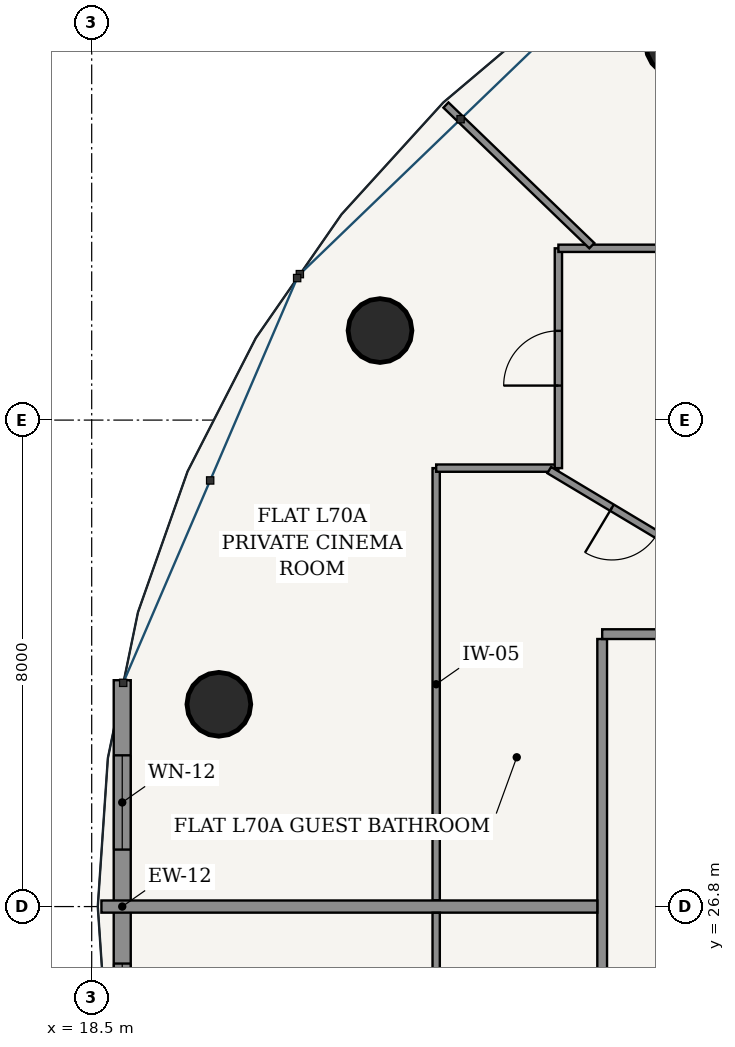
"""IFC4 building model, lengths in metres.
Left out: names, types, materials, properties, quantities, classifications, styles, units other than length and angle.
Written with IfcOpenShell. Run it as: python <this file> out.ifc"""

import sys

from ifc_helpers import new_model, si_unit, direction, frame, frame_2d, origin, origin_2d, place, context, subcontext, project, spatial, rectangle, hollow_circle, extrude, source, transform, mapped, element, fill, save


model = new_model("IFC4")
c1 = context("Model", 3, precision=1e-05, world=origin(), true_north=direction((-0.2419218956, 0.970295726276)))
c2 = subcontext(c1, "Body", "Model", "MODEL_VIEW")
j1 = project(units=[si_unit("LENGTHUNIT", "METRE"), si_unit("PLANEANGLEUNIT", "RADIAN")], contexts=[c1])
p1 = place(None, origin())
s1 = spatial("IfcSite", under=j1, at=p1, CompositionType="ELEMENT")
p2 = place(p1, origin())
s2 = spatial("IfcBuilding", under=s1, at=p2, CompositionType="ELEMENT")
p3 = place(p2, frame((0.0, 0.0, 266.95)))
s3 = spatial("IfcBuildingStorey", under=s2, at=p3, CompositionType="ELEMENT", Elevation=266.95)
for number, where, z_axis, x_axis in (
    (1, (28.139, 40.977, 0.0), (0.0, 0.0, 1.0), (1.0, 0.0, 0.0)),
    (2, (23.241, 36.272, 0.0), (0.0, 0.0, 1.0), (1.0, 0.0, 0.0)),
    (3, (20.591, 30.126, 0.0), (0.0, 0.0, 1.0), (1.0, 0.0, 0.0)),
):
    element("IfcColumn", number, at=place(p3, frame(where, z_axis=z_axis, x_axis=x_axis)), inside=s3, PredefinedType="COLUMN", context=c2, shape_type="SweptSolid", body=[
        extrude(hollow_circle(Radius=0.525, WallThickness=0.035, at=origin_2d()), origin(), (0.0, 0.0, 1.0), 3.75),
    ])
p4 = place(p3, frame((19.002, 30.522, 0.0), z_axis=(0.0, 0.0, 1.0), x_axis=(0.0, -1.0, 0.0)))
e4 = element("IfcWall", 4, at=p4, inside=s3, PredefinedType="SOLIDWALL", context=c2, shape_type="SweptSolid", body=[
    extrude(rectangle(XDim=7.445, YDim=0.28, at=frame_2d((3.722, 0.0))), origin(), (0.0, 0.0, 1.0), 3.49),
])
p5 = place(p4, frame((1.235, 0.0, 0.85)))
e5 = element("IfcOpeningElement", 5, at=p5, cuts=e4, PredefinedType="OPENING", context=c2, shape_type="SweptSolid", body=[
    extrude(rectangle(XDim=1.55, YDim=1.95, at=frame_2d((0.775, 0.975))), frame((0.0, 0.15, 0.0), z_axis=(0.0, -1.0, 0.0), x_axis=(1.0, 0.0, 0.0)), (0.0, 0.0, 1.0), 0.3),
])
p6 = place(p4, frame((4.66, 0.0, 0.85)))
e6 = element("IfcOpeningElement", 6, at=p6, cuts=e4, PredefinedType="OPENING", context=c2, shape_type="SweptSolid", body=[
    extrude(rectangle(XDim=1.55, YDim=1.95, at=frame_2d((0.775, 0.975))), frame((0.0, 0.15, 0.0), z_axis=(0.0, -1.0, 0.0), x_axis=(1.0, 0.0, 0.0)), (0.0, 0.0, 1.0), 0.3),
])
p7 = place(p3, frame((26.895, 17.275, 0.0), z_axis=(0.0, 0.0, 1.0), x_axis=(0.0, 1.0, 0.0)))
e7 = element("IfcWall", 7, at=p7, inside=s3, PredefinedType="PARTITIONING", context=c2, shape_type="SweptSolid", body=[
    extrude(rectangle(XDim=13.925, YDim=0.16, at=frame_2d((6.962, 0.0))), origin(), (0.0, 0.0, 1.0), 3.015),
])
p8 = place(p7, frame((1.992, 0.0, 0.0)))
e8 = element("IfcOpeningElement", 8, at=p8, cuts=e7, PredefinedType="OPENING", context=c2, shape_type="SweptSolid", body=[
    extrude(rectangle(XDim=0.98, YDim=2.2, at=frame_2d((0.49, 1.1))), frame((0.0, 0.09, 0.0), z_axis=(0.0, -1.0, 0.0), x_axis=(1.0, 0.0, 0.0)), (0.0, 0.0, 1.0), 0.18),
])
p9 = place(p3, frame((26.895, 31.28, 0.0), z_axis=(0.0, 0.0, 1.0), x_axis=(1.0, 0.0, 0.0)))
e9 = element("IfcWall", 9, at=p9, inside=s3, PredefinedType="PARTITIONING", context=c2, shape_type="SweptSolid", body=[
    extrude(rectangle(XDim=1.93, YDim=0.16, at=frame_2d((0.965, 0.0))), origin(), (0.0, 0.0, 1.0), 3.49),
])
p10 = place(p3, frame((24.165, 26.902, 0.0), z_axis=(0.0, 0.0, 1.0), x_axis=(0.0, 1.0, 0.0)))
e10 = element("IfcWall", 10, at=p10, inside=s3, PredefinedType="PARTITIONING", context=c2, shape_type="SweptSolid", body=[
    extrude(rectangle(XDim=7.108, YDim=0.12, at=frame_2d((3.554, 0.0))), origin(), (0.0, 0.0, 1.0), 3.015),
])
p11 = place(p3, frame((24.165, 34.01, 0.0), z_axis=(0.0, 0.0, 1.0), x_axis=(1.0, 0.0, 0.0)))
e11 = element("IfcWall", 11, at=p11, inside=s3, PredefinedType="PARTITIONING", context=c2, shape_type="SweptSolid", body=[
    extrude(rectangle(XDim=2.01, YDim=0.12, at=frame_2d((1.005, 0.0))), origin(), (0.0, 0.0, 1.0), 3.209),
])
p12 = place(p3, frame((26.175, 34.01, 0.0), z_axis=(0.0, 0.0, 1.0), x_axis=(0.0, 1.0, 0.0)))
e12 = element("IfcWall", 12, at=p12, inside=s3, PredefinedType="PARTITIONING", context=c2, shape_type="SweptSolid", body=[
    extrude(rectangle(XDim=3.615, YDim=0.12, at=frame_2d((1.808, 0.0))), origin(), (0.0, 0.0, 1.0), 3.015),
])
p13 = place(p12, frame((1.357, 0.0, 0.0)))
e13 = element("IfcOpeningElement", 13, at=p13, cuts=e12, PredefinedType="OPENING", context=c2, shape_type="SweptSolid", body=[
    extrude(rectangle(XDim=0.9, YDim=2.15, at=frame_2d((0.45, 1.075))), frame((0.0, 0.07, 0.0), z_axis=(0.0, -1.0, 0.0), x_axis=(1.0, 0.0, 0.0)), (0.0, 0.0, 1.0), 0.14),
])
p14 = place(p3, frame((26.175, 37.625, 0.0), z_axis=(0.0, 0.0, 1.0), x_axis=(1.0, 0.0, 0.0)))
e14 = element("IfcWall", 14, at=p14, inside=s3, PredefinedType="PARTITIONING", context=c2, shape_type="SweptSolid", body=[
    extrude(rectangle(XDim=23.65, YDim=0.12, at=frame_2d((11.825, 0.0))), origin(), (0.0, 0.0, 1.0), 3.015),
])
p15 = place(p14, frame((14.733, 0.0, 0.0)))
e15 = element("IfcOpeningElement", 15, at=p15, cuts=e14, PredefinedType="OPENING", context=c2, shape_type="SweptSolid", body=[
    extrude(rectangle(XDim=0.9, YDim=2.15, at=frame_2d((0.45, 1.075))), frame((0.0, 0.07, 0.0), z_axis=(0.0, -1.0, 0.0), x_axis=(1.0, 0.0, 0.0)), (0.0, 0.0, 1.0), 0.14),
])
p16 = place(p14, frame((11.279, 0.0, 0.0)))
e16 = element("IfcOpeningElement", 16, at=p16, cuts=e14, PredefinedType="OPENING", context=c2, shape_type="SweptSolid", body=[
    extrude(rectangle(XDim=0.9, YDim=2.15, at=frame_2d((0.45, 1.075))), frame((0.0, 0.07, 0.0), z_axis=(0.0, -1.0, 0.0), x_axis=(1.0, 0.0, 0.0)), (0.0, 0.0, 1.0), 0.14),
])
p17 = place(p14, frame((2.678, 0.0, 0.0)))
e17 = element("IfcOpeningElement", 17, at=p17, cuts=e14, PredefinedType="OPENING", context=c2, shape_type="SweptSolid", body=[
    extrude(rectangle(XDim=0.9, YDim=2.15, at=frame_2d((0.45, 1.075))), frame((0.0, 0.07, 0.0), z_axis=(0.0, -1.0, 0.0), x_axis=(1.0, 0.0, 0.0)), (0.0, 0.0, 1.0), 0.14),
])
p18 = place(p3, frame((26.725, 37.668, 0.0), z_axis=(0.0, 0.0, 1.0), x_axis=(-0.719954096891, 0.694021684366, 0.0)))
e18 = element("IfcWall", 18, at=p18, inside=s3, PredefinedType="PARTITIONING", context=c2, shape_type="SweptSolid", body=[
    extrude(rectangle(XDim=3.333, YDim=0.12, at=frame_2d((1.667, 0.0))), origin(), (0.0, 0.0, 1.0), 3.121),
])
p19 = place(p3, frame((28.825, 32.3, 0.0), z_axis=(0.0, 0.0, 1.0), x_axis=(-0.857743539935, 0.514077834282, 0.0)))
e19 = element("IfcWall", 19, at=p19, inside=s3, PredefinedType="PARTITIONING", context=c2, shape_type="SweptSolid", body=[
    extrude(rectangle(XDim=3.265, YDim=0.12, at=frame_2d((1.632, 0.0))), origin(), (0.0, 0.0, 1.0), 3.49),
])
p20 = place(p19, frame((1.202, 0.0, 0.0)))
e20 = element("IfcOpeningElement", 20, at=p20, cuts=e19, PredefinedType="OPENING", context=c2, shape_type="SweptSolid", body=[
    extrude(rectangle(XDim=0.86, YDim=2.15, at=frame_2d((0.43, 1.075))), frame((0.0, 0.07, 0.0), z_axis=(0.0, -1.0, 0.0), x_axis=(1.0, 0.0, 0.0)), (0.0, 0.0, 1.0), 0.14),
])
p21 = place(p3, frame((26.815, 26.8, 0.0), z_axis=(0.0, 0.0, 1.0), x_axis=(-1.0, 0.0, 0.0)))
e21 = element("IfcWall", 21, at=p21, inside=s3, PredefinedType="PARTITIONING", context=c2, shape_type="SweptSolid", body=[
    extrude(rectangle(XDim=8.155, YDim=0.2, at=frame_2d((4.078, 0.0))), origin(), (0.0, 0.0, 1.0), 3.121),
])
p22 = place(p3, frame((24.165, 14.465, 0.0), z_axis=(0.0, 0.0, 1.0), x_axis=(0.0, 1.0, 0.0)))
e22 = element("IfcWall", 22, at=p22, inside=s3, PredefinedType="PARTITIONING", context=c2, shape_type="SweptSolid", body=[
    extrude(rectangle(XDim=12.233, YDim=0.12, at=frame_2d((6.116, 0.0))), origin(), (0.0, 0.0, 1.0), 3.015),
])
p23 = place(p22, frame((3.863, 0.0, 0.0)))
e23 = element("IfcOpeningElement", 23, at=p23, cuts=e22, PredefinedType="OPENING", context=c2, shape_type="SweptSolid", body=[
    extrude(rectangle(XDim=0.9, YDim=2.15, at=frame_2d((0.45, 1.075))), frame((0.0, 0.07, 0.0), z_axis=(0.0, -1.0, 0.0), x_axis=(1.0, 0.0, 0.0)), (0.0, 0.0, 1.0), 0.14),
])
m1 = source(origin(), c2, "Body", "SweptSolid", [
    extrude(rectangle(XDim=1.55, YDim=1.95, at=frame_2d((0.775, 0.975))), frame((0.0, 0.03, 0.0), z_axis=(0.0, -1.0, 0.0), x_axis=(1.0, 0.0, 0.0)), (0.0, 0.0, 1.0), 0.06),
])
p24 = place(p5, origin())
e24 = element("IfcWindow", 24, at=p24, inside=s3, PartitioningType="SINGLE_PANEL", PredefinedType="WINDOW", context=c2, shape_type="MappedRepresentation", body=[
    mapped(m1, transform((0.0, 0.0, 0.0), scale=1.0)),
])
fill(e5, e24)
p25 = place(p6, origin())
e25 = element("IfcWindow", 25, at=p25, inside=s3, PartitioningType="SINGLE_PANEL", PredefinedType="WINDOW", context=c2, shape_type="MappedRepresentation", body=[
    mapped(m1, transform((0.0, 0.0, 0.0), scale=1.0)),
])
fill(e6, e25)
m2 = source(origin(), c2, "Body", "SweptSolid", [
    extrude(rectangle(XDim=0.86, YDim=2.15, at=frame_2d((0.43, 1.075))), frame((0.0, 0.025, 0.0), z_axis=(0.0, -1.0, 0.0), x_axis=(1.0, 0.0, 0.0)), (0.0, 0.0, 1.0), 0.05),
])
p26 = place(p20, origin())
e26 = element("IfcDoor", 26, at=p26, inside=s3, OperationType="SINGLE_SWING_RIGHT", PredefinedType="DOOR", context=c2, shape_type="MappedRepresentation", body=[
    mapped(m2, transform((0.0, 0.0, 0.0), scale=1.0)),
])
fill(e20, e26)
m3 = source(origin(), c2, "Body", "SweptSolid", [
    extrude(rectangle(XDim=0.9, YDim=2.15, at=frame_2d((0.45, 1.075))), frame((0.0, 0.025, 0.0), z_axis=(0.0, -1.0, 0.0), x_axis=(1.0, 0.0, 0.0)), (0.0, 0.0, 1.0), 0.05),
])
p27 = place(p13, origin())
e27 = element("IfcDoor", 27, at=p27, inside=s3, OperationType="SINGLE_SWING_LEFT", PredefinedType="DOOR", context=c2, shape_type="MappedRepresentation", body=[
    mapped(m3, transform((0.0, 0.0, 0.0), scale=1.0)),
])
fill(e13, e27)
save(model, sys.argv[1])
